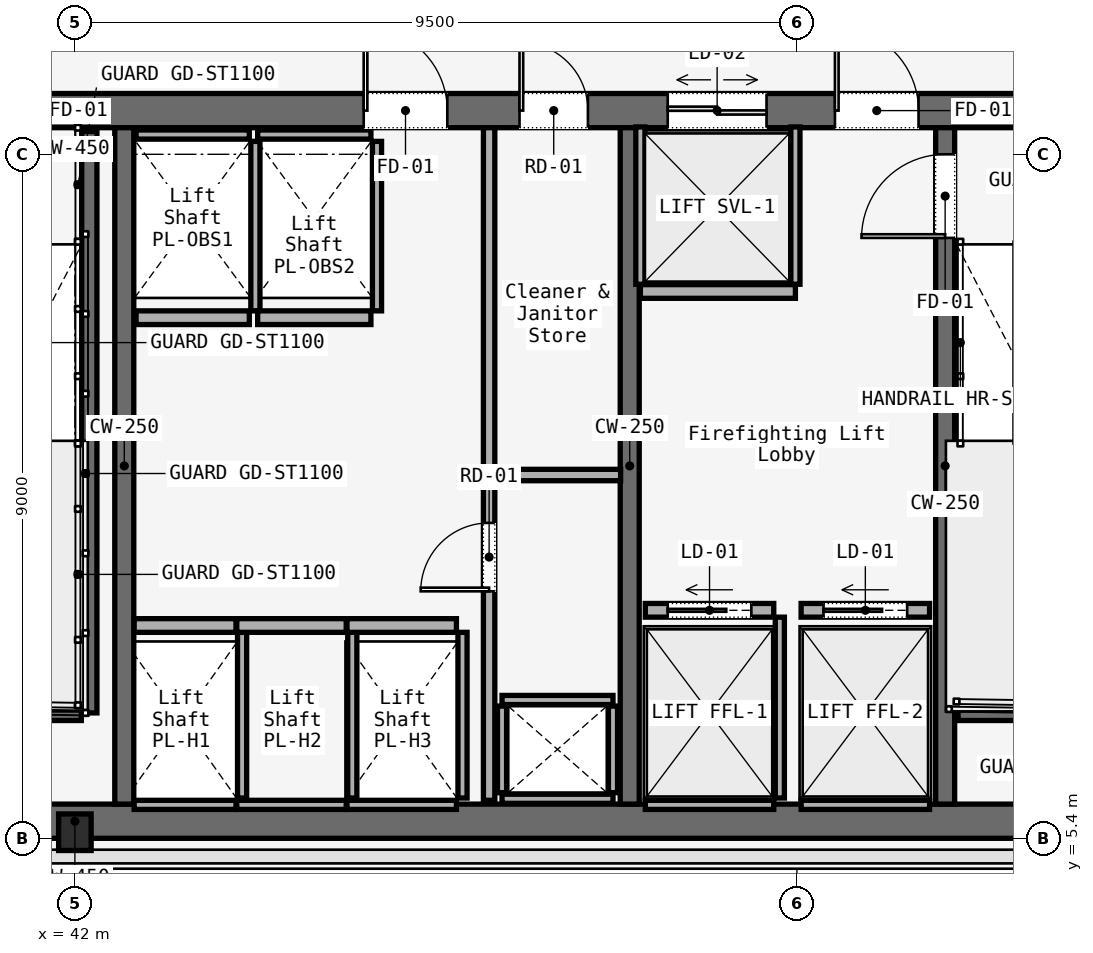
"""IFC4 building model, lengths in metres.
Left out: names, types, materials, properties, quantities, classifications, styles, units other than length and angle.
Written with IfcOpenShell. Run it as: python <this file> out.ifc"""

import sys

from ifc_helpers import new_model, si_unit, direction, frame, frame_2d, origin, origin_2d, place, context, subcontext, project, spatial, rectangle, i_section, extrude, element, fill, save


model = new_model("IFC4")
c1 = context("Model", 3, precision=1e-05, world=origin(), true_north=direction((0.0, 1.0)))
c2 = subcontext(c1, "Body", "Model", "MODEL_VIEW")
j1 = project(units=[si_unit("LENGTHUNIT", "METRE"), si_unit("PLANEANGLEUNIT", "RADIAN")], contexts=[c1])
p1 = place(None, origin())
s1 = spatial("IfcSite", under=j1, at=p1, CompositionType="ELEMENT")
p2 = place(p1, origin())
s2 = spatial("IfcBuilding", under=s1, at=p2, CompositionType="ELEMENT")
p3 = place(p2, frame((0.0, 0.0, 146.0)))
s3 = spatial("IfcBuildingStorey", under=s2, at=p3, CompositionType="ELEMENT", Elevation=146.0)
p4 = place(p3, frame((26.45, 14.975, 0.0), z_axis=(0.0, 0.0, 1.0), x_axis=(1.0, 0.0, 0.0)))
e1 = element("IfcWall", 1, at=p4, inside=s3, PredefinedType="SOLIDWALL", context=c2, shape_type="SweptSolid", body=[
    extrude(rectangle(XDim=31.1, YDim=0.45, at=frame_2d((15.55, 0.0))), origin(), (0.0, 0.0, 1.0), 3.58),
])
p5 = place(p4, frame((1.65, 0.0, 0.0)))
e2 = element("IfcOpeningElement", 2, at=p5, cuts=e1, PredefinedType="OPENING", context=c2, shape_type="SweptSolid", body=[
    extrude(rectangle(XDim=1.1, YDim=2.2, at=frame_2d((0.55, 1.1))), frame((0.0, 0.225, 0.0), z_axis=(0.0, -1.0, 0.0), x_axis=(1.0, 0.0, 0.0)), (0.0, 0.0, 1.0), 0.45),
])
p6 = place(p4, frame((13.65, 0.0, 0.0)))
e3 = element("IfcOpeningElement", 3, at=p6, cuts=e1, PredefinedType="OPENING", context=c2, shape_type="SweptSolid", body=[
    extrude(rectangle(XDim=1.1, YDim=2.2, at=frame_2d((0.55, 1.1))), frame((0.0, 0.225, 0.0), z_axis=(0.0, -1.0, 0.0), x_axis=(1.0, 0.0, 0.0)), (0.0, 0.0, 1.0), 0.45),
])
p7 = place(p4, frame((25.55, 0.0, 0.0)))
e4 = element("IfcOpeningElement", 4, at=p7, cuts=e1, PredefinedType="OPENING", context=c2, shape_type="SweptSolid", body=[
    extrude(rectangle(XDim=1.1, YDim=2.2, at=frame_2d((0.55, 1.1))), frame((0.0, 0.225, 0.0), z_axis=(0.0, -1.0, 0.0), x_axis=(1.0, 0.0, 0.0)), (0.0, 0.0, 1.0), 0.45),
])
p8 = place(p4, frame((10.7, 0.0, 0.0)))
e5 = element("IfcOpeningElement", 5, at=p8, cuts=e1, PredefinedType="OPENING", context=c2, shape_type="SweptSolid", body=[
    extrude(rectangle(XDim=1.4, YDim=2.2, at=frame_2d((0.7, 1.1))), frame((0.0, 0.225, 0.0), z_axis=(0.0, -1.0, 0.0), x_axis=(1.0, 0.0, 0.0)), (0.0, 0.0, 1.0), 0.45),
])
p9 = place(p4, frame((19.35, 0.0, 0.0)))
e6 = element("IfcOpeningElement", 6, at=p9, cuts=e1, PredefinedType="OPENING", context=c2, shape_type="SweptSolid", body=[
    extrude(rectangle(XDim=1.1, YDim=2.2, at=frame_2d((0.55, 1.1))), frame((0.0, 0.225, 0.0), z_axis=(0.0, -1.0, 0.0), x_axis=(1.0, 0.0, 0.0)), (0.0, 0.0, 1.0), 0.45),
])
p10 = place(p4, frame((21.4, 0.0, 0.0)))
e7 = element("IfcOpeningElement", 7, at=p10, cuts=e1, PredefinedType="OPENING", context=c2, shape_type="SweptSolid", body=[
    extrude(rectangle(XDim=0.9, YDim=2.1, at=frame_2d((0.45, 1.05))), frame((0.0, 0.225, 0.0), z_axis=(0.0, -1.0, 0.0), x_axis=(1.0, 0.0, 0.0)), (0.0, 0.0, 1.0), 0.45),
])
p11 = place(p4, frame((23.35, 0.0, 0.0)))
e8 = element("IfcOpeningElement", 8, at=p11, cuts=e1, PredefinedType="OPENING", context=c2, shape_type="SweptSolid", body=[
    extrude(rectangle(XDim=1.3, YDim=2.3, at=frame_2d((0.65, 1.15))), frame((0.0, 0.225, 0.0), z_axis=(0.0, -1.0, 0.0), x_axis=(1.0, 0.0, 0.0)), (0.0, 0.0, 1.0), 0.45),
])
p12 = place(p3, frame((26.45, 5.625, 0.0), z_axis=(0.0, 0.0, 1.0), x_axis=(1.0, 0.0, 0.0)))
e9 = element("IfcWall", 9, at=p12, inside=s3, PredefinedType="SOLIDWALL", context=c2, shape_type="SweptSolid", body=[
    extrude(rectangle(XDim=31.1, YDim=0.45, at=frame_2d((15.55, 0.0))), origin(), (0.0, 0.0, 1.0), 3.58),
])
for number, where, z_axis, x_axis in (
    (10, (42.65, 5.85, 0.0), (0.0, 0.0, 1.0), (0.0, 1.0, 0.0)),
    (11, (49.3, 5.85, 0.0), (0.0, 0.0, 1.0), (0.0, 1.0, 0.0)),
):
    element("IfcWall", number, at=place(p3, frame(where, z_axis=z_axis, x_axis=x_axis)), inside=s3, PredefinedType="SOLIDWALL", context=c2, shape_type="SweptSolid", body=[
        extrude(rectangle(XDim=8.9, YDim=0.25, at=frame_2d((4.45, 0.0))), origin(), (0.0, 0.0, 1.0), 3.58),
    ])
p13 = place(p3, frame((53.45, 5.85, 0.0), z_axis=(0.0, 0.0, 1.0), x_axis=(0.0, 1.0, 0.0)))
e12 = element("IfcWall", 12, at=p13, inside=s3, PredefinedType="SOLIDWALL", context=c2, shape_type="SweptSolid", body=[
    extrude(rectangle(XDim=8.9, YDim=0.25, at=frame_2d((4.45, 0.0))), origin(), (0.0, 0.0, 1.0), 3.58),
])
p14 = place(p13, frame((7.45, 0.0, 0.0)))
e13 = element("IfcOpeningElement", 13, at=p14, cuts=e12, PredefinedType="OPENING", context=c2, shape_type="SweptSolid", body=[
    extrude(rectangle(XDim=1.1, YDim=2.2, at=frame_2d((0.55, 1.1))), frame((0.0, 0.125, 0.0), z_axis=(0.0, -1.0, 0.0), x_axis=(1.0, 0.0, 0.0)), (0.0, 0.0, 1.0), 0.25),
])
p15 = place(p3, frame((42.0, 5.48, 0.0), z_axis=(0.0, 0.0, 1.0), x_axis=(1.0, 0.0, 0.0)))
e14 = element("IfcColumn", 14, at=p15, inside=s3, PredefinedType="COLUMN", context=c2, shape_type="SweptSolid", body=[
    extrude(i_section(OverallWidth=0.428, OverallDepth=0.481, WebThickness=0.051, FlangeThickness=0.065, FilletRadius=0.015, at=origin_2d()), origin(), (0.0, 0.0, 1.0), 3.58),
])
p16 = place(p3, frame((42.19, 14.7, 0.0), z_axis=(0.0, 0.0, 1.0), x_axis=(0.0, -1.0, 0.0)))
e15 = element("IfcWall", 15, at=p16, inside=s3, PredefinedType="SOLIDWALL", context=c2, shape_type="SweptSolid", body=[
    extrude(rectangle(XDim=7.65, YDim=0.2, at=frame_2d((3.825, 0.0))), origin(), (0.0, 0.0, 1.0), 3.8),
])
for number, where, z_axis, x_axis in (
    (16, (38.97, 7.05, 0.0), (0.0, 0.0, 1.0), (1.0, 0.0, 0.0)),
    (17, (53.62, 7.05, 0.0), (0.0, 0.0, 1.0), (1.0, 0.0, 0.0)),
):
    element("IfcWall", number, at=place(p3, frame(where, z_axis=z_axis, x_axis=x_axis)), inside=s3, PredefinedType="SOLIDWALL", context=c2, shape_type="SweptSolid", body=[
        extrude(rectangle(XDim=3.115, YDim=0.2, at=frame_2d((1.558, 0.0))), origin(), (0.0, 0.0, 1.0), 3.8),
    ])
for number, where, z_axis, x_axis in (
    (18, (47.62, 5.92, 0.0), (0.0, 0.0, 1.0), (1.0, 0.0, 0.0)),
    (19, (47.62, 7.22, 0.0), (0.0, 0.0, 1.0), (1.0, 0.0, 0.0)),
):
    element("IfcWall", number, at=place(p3, frame(where, z_axis=z_axis, x_axis=x_axis)), inside=s3, PredefinedType="SOLIDWALL", context=c2, shape_type="SweptSolid", body=[
        extrude(rectangle(XDim=1.46, YDim=0.12, at=frame_2d((0.73, 0.0))), origin(), (0.0, 0.0, 1.0), 3.01),
    ])
for number, where, z_axis, x_axis in (
    (20, (47.62, 6.0, 0.0), (0.0, 0.0, 1.0), (0.0, 1.0, 0.0)),
    (21, (49.08, 6.0, 0.0), (0.0, 0.0, 1.0), (0.0, 1.0, 0.0)),
):
    element("IfcWall", number, at=place(p3, frame(where, z_axis=z_axis, x_axis=x_axis)), inside=s3, PredefinedType="SOLIDWALL", context=c2, shape_type="SweptSolid", body=[
        extrude(rectangle(XDim=1.14, YDim=0.12, at=frame_2d((0.57, 0.0))), origin(), (0.0, 0.0, 1.0), 3.01),
    ])
p17 = place(p3, frame((47.45, 5.9, 0.0), z_axis=(0.0, 0.0, 1.0), x_axis=(0.0, 1.0, 0.0)))
e22 = element("IfcWall", 22, at=p17, inside=s3, PredefinedType="PARTITIONING", context=c2, shape_type="SweptSolid", body=[
    extrude(rectangle(XDim=8.85, YDim=0.15, at=frame_2d((4.425, 0.0))), origin(), (0.0, 0.0, 1.0), 3.01),
])
p18 = place(p17, frame((2.75, 0.0, 0.0)))
e23 = element("IfcOpeningElement", 23, at=p18, cuts=e22, PredefinedType="OPENING", context=c2, shape_type="SweptSolid", body=[
    extrude(rectangle(XDim=0.9, YDim=2.1, at=frame_2d((0.45, 1.05))), frame((0.0, 0.075, 0.0), z_axis=(0.0, -1.0, 0.0), x_axis=(1.0, 0.0, 0.0)), (0.0, 0.0, 1.0), 0.15),
])
p19 = place(p3, frame((47.45, 10.18, 0.0), z_axis=(0.0, 0.0, 1.0), x_axis=(1.0, 0.0, 0.0)))
e24 = element("IfcWall", 24, at=p19, inside=s3, PredefinedType="PARTITIONING", context=c2, shape_type="SweptSolid", body=[
    extrude(rectangle(XDim=1.73, YDim=0.15, at=frame_2d((0.865, 0.0))), origin(), (0.0, 0.0, 1.0), 3.01),
])
p20 = place(p3, frame((42.78, 8.2, 0.0), z_axis=(0.0, 0.0, 1.0), x_axis=(1.0, 0.0, 0.0)))
e25 = element("IfcWall", 25, at=p20, inside=s3, PredefinedType="SOLIDWALL", context=c2, shape_type="SweptSolid", body=[
    extrude(rectangle(XDim=1.34, YDim=0.18, at=frame_2d((0.67, 0.0))), origin(), (0.0, 0.0, 1.0), 3.01),
])
p21 = place(p3, frame((42.78, 5.84, 0.0), z_axis=(0.0, 0.0, 1.0), x_axis=(1.0, 0.0, 0.0)))
e26 = element("IfcWall", 26, at=p21, inside=s3, PredefinedType="SOLIDWALL", context=c2, shape_type="SweptSolid", body=[
    extrude(rectangle(XDim=1.34, YDim=0.12, at=frame_2d((0.67, 0.0))), origin(), (0.0, 0.0, 1.0), 3.01),
])
p22 = place(p3, frame((44.2, 5.93, 0.0), z_axis=(0.0, 0.0, 1.0), x_axis=(0.0, 1.0, 0.0)))
e27 = element("IfcWall", 27, at=p22, inside=s3, PredefinedType="SOLIDWALL", context=c2, shape_type="SweptSolid", body=[
    extrude(rectangle(XDim=2.18, YDim=0.12, at=frame_2d((1.09, 0.0))), origin(), (0.0, 0.0, 1.0), 3.01),
])
p23 = place(p3, frame((44.13, 8.2, 0.0), z_axis=(0.0, 0.0, 1.0), x_axis=(1.0, 0.0, 0.0)))
e28 = element("IfcWall", 28, at=p23, inside=s3, PredefinedType="SOLIDWALL", context=c2, shape_type="SweptSolid", body=[
    extrude(rectangle(XDim=1.44, YDim=0.18, at=frame_2d((0.72, 0.0))), origin(), (0.0, 0.0, 1.0), 3.01),
])
p24 = place(p3, frame((44.13, 5.84, 0.0), z_axis=(0.0, 0.0, 1.0), x_axis=(1.0, 0.0, 0.0)))
e29 = element("IfcWall", 29, at=p24, inside=s3, PredefinedType="SOLIDWALL", context=c2, shape_type="SweptSolid", body=[
    extrude(rectangle(XDim=1.44, YDim=0.12, at=frame_2d((0.72, 0.0))), origin(), (0.0, 0.0, 1.0), 3.01),
])
p25 = place(p3, frame((45.65, 5.93, 0.0), z_axis=(0.0, 0.0, 1.0), x_axis=(0.0, 1.0, 0.0)))
e30 = element("IfcWall", 30, at=p25, inside=s3, PredefinedType="SOLIDWALL", context=c2, shape_type="SweptSolid", body=[
    extrude(rectangle(XDim=2.18, YDim=0.12, at=frame_2d((1.09, 0.0))), origin(), (0.0, 0.0, 1.0), 3.01),
])
p26 = place(p3, frame((45.58, 8.2, 0.0), z_axis=(0.0, 0.0, 1.0), x_axis=(1.0, 0.0, 0.0)))
e31 = element("IfcWall", 31, at=p26, inside=s3, PredefinedType="SOLIDWALL", context=c2, shape_type="SweptSolid", body=[
    extrude(rectangle(XDim=1.44, YDim=0.18, at=frame_2d((0.72, 0.0))), origin(), (0.0, 0.0, 1.0), 3.01),
])
p27 = place(p3, frame((45.58, 5.84, 0.0), z_axis=(0.0, 0.0, 1.0), x_axis=(1.0, 0.0, 0.0)))
e32 = element("IfcWall", 32, at=p27, inside=s3, PredefinedType="SOLIDWALL", context=c2, shape_type="SweptSolid", body=[
    extrude(rectangle(XDim=1.44, YDim=0.12, at=frame_2d((0.72, 0.0))), origin(), (0.0, 0.0, 1.0), 3.01),
])
p28 = place(p3, frame((47.1, 5.93, 0.0), z_axis=(0.0, 0.0, 1.0), x_axis=(0.0, 1.0, 0.0)))
e33 = element("IfcWall", 33, at=p28, inside=s3, PredefinedType="SOLIDWALL", context=c2, shape_type="SweptSolid", body=[
    extrude(rectangle(XDim=2.18, YDim=0.12, at=frame_2d((1.09, 0.0))), origin(), (0.0, 0.0, 1.0), 3.01),
])
p29 = place(p3, frame((42.805, 12.25, 0.0), z_axis=(0.0, 0.0, 1.0), x_axis=(1.0, 0.0, 0.0)))
e34 = element("IfcWall", 34, at=p29, inside=s3, PredefinedType="SOLIDWALL", context=c2, shape_type="SweptSolid", body=[
    extrude(rectangle(XDim=1.49, YDim=0.18, at=frame_2d((0.745, 0.0))), origin(), (0.0, 0.0, 1.0), 3.01),
])
p30 = place(p3, frame((42.805, 14.66, 0.0), z_axis=(0.0, 0.0, 1.0), x_axis=(1.0, 0.0, 0.0)))
e35 = element("IfcWall", 35, at=p30, inside=s3, PredefinedType="SOLIDWALL", context=c2, shape_type="SweptSolid", body=[
    extrude(rectangle(XDim=1.49, YDim=0.12, at=frame_2d((0.745, 0.0))), origin(), (0.0, 0.0, 1.0), 3.01),
])
p31 = place(p3, frame((44.375, 12.34, 0.0), z_axis=(0.0, 0.0, 1.0), x_axis=(0.0, 1.0, 0.0)))
e36 = element("IfcWall", 36, at=p31, inside=s3, PredefinedType="SOLIDWALL", context=c2, shape_type="SweptSolid", body=[
    extrude(rectangle(XDim=2.23, YDim=0.12, at=frame_2d((1.115, 0.0))), origin(), (0.0, 0.0, 1.0), 3.01),
])
p32 = place(p3, frame((44.405, 12.25, 0.0), z_axis=(0.0, 0.0, 1.0), x_axis=(1.0, 0.0, 0.0)))
e37 = element("IfcWall", 37, at=p32, inside=s3, PredefinedType="SOLIDWALL", context=c2, shape_type="SweptSolid", body=[
    extrude(rectangle(XDim=1.49, YDim=0.18, at=frame_2d((0.745, 0.0))), origin(), (0.0, 0.0, 1.0), 3.01),
])
p33 = place(p3, frame((44.405, 14.66, 0.0), z_axis=(0.0, 0.0, 1.0), x_axis=(1.0, 0.0, 0.0)))
e38 = element("IfcWall", 38, at=p33, inside=s3, PredefinedType="SOLIDWALL", context=c2, shape_type="SweptSolid", body=[
    extrude(rectangle(XDim=1.49, YDim=0.12, at=frame_2d((0.745, 0.0))), origin(), (0.0, 0.0, 1.0), 3.01),
])
p34 = place(p3, frame((45.975, 12.34, 0.0), z_axis=(0.0, 0.0, 1.0), x_axis=(0.0, 1.0, 0.0)))
e39 = element("IfcWall", 39, at=p34, inside=s3, PredefinedType="SOLIDWALL", context=c2, shape_type="SweptSolid", body=[
    extrude(rectangle(XDim=2.23, YDim=0.12, at=frame_2d((1.115, 0.0))), origin(), (0.0, 0.0, 1.0), 3.01),
])
p35 = place(p3, frame((49.505, 8.4, 0.0), z_axis=(0.0, 0.0, 1.0), x_axis=(1.0, 0.0, 0.0)))
e40 = element("IfcWall", 40, at=p35, inside=s3, PredefinedType="SOLIDWALL", context=c2, shape_type="SweptSolid", body=[
    extrude(rectangle(XDim=1.69, YDim=0.18, at=frame_2d((0.845, 0.0))), origin(), (0.0, 0.0, 1.0), 3.01),
])
p36 = place(p35, frame((0.295, 0.0, 0.0)))
e41 = element("IfcOpeningElement", 41, at=p36, cuts=e40, PredefinedType="OPENING", context=c2, shape_type="SweptSolid", body=[
    extrude(rectangle(XDim=1.1, YDim=2.2, at=frame_2d((0.55, 1.1))), frame((0.0, 0.09, 0.0), z_axis=(0.0, -1.0, 0.0), x_axis=(1.0, 0.0, 0.0)), (0.0, 0.0, 1.0), 0.18),
])
p37 = place(p3, frame((49.505, 5.84, 0.0), z_axis=(0.0, 0.0, 1.0), x_axis=(1.0, 0.0, 0.0)))
e42 = element("IfcWall", 42, at=p37, inside=s3, PredefinedType="SOLIDWALL", context=c2, shape_type="SweptSolid", body=[
    extrude(rectangle(XDim=1.69, YDim=0.12, at=frame_2d((0.845, 0.0))), origin(), (0.0, 0.0, 1.0), 3.01),
])
p38 = place(p3, frame((51.275, 5.93, 0.0), z_axis=(0.0, 0.0, 1.0), x_axis=(0.0, 1.0, 0.0)))
e43 = element("IfcWall", 43, at=p38, inside=s3, PredefinedType="SOLIDWALL", context=c2, shape_type="SweptSolid", body=[
    extrude(rectangle(XDim=2.38, YDim=0.12, at=frame_2d((1.19, 0.0))), origin(), (0.0, 0.0, 1.0), 3.01),
])
p39 = place(p3, frame((51.555, 8.4, 0.0), z_axis=(0.0, 0.0, 1.0), x_axis=(1.0, 0.0, 0.0)))
e44 = element("IfcWall", 44, at=p39, inside=s3, PredefinedType="SOLIDWALL", context=c2, shape_type="SweptSolid", body=[
    extrude(rectangle(XDim=1.69, YDim=0.18, at=frame_2d((0.845, 0.0))), origin(), (0.0, 0.0, 1.0), 3.01),
])
p40 = place(p39, frame((0.295, 0.0, 0.0)))
e45 = element("IfcOpeningElement", 45, at=p40, cuts=e44, PredefinedType="OPENING", context=c2, shape_type="SweptSolid", body=[
    extrude(rectangle(XDim=1.1, YDim=2.2, at=frame_2d((0.55, 1.1))), frame((0.0, 0.09, 0.0), z_axis=(0.0, -1.0, 0.0), x_axis=(1.0, 0.0, 0.0)), (0.0, 0.0, 1.0), 0.18),
])
p41 = place(p3, frame((51.555, 5.84, 0.0), z_axis=(0.0, 0.0, 1.0), x_axis=(1.0, 0.0, 0.0)))
e46 = element("IfcWall", 46, at=p41, inside=s3, PredefinedType="SOLIDWALL", context=c2, shape_type="SweptSolid", body=[
    extrude(rectangle(XDim=1.69, YDim=0.12, at=frame_2d((0.845, 0.0))), origin(), (0.0, 0.0, 1.0), 3.01),
])
p42 = place(p3, frame((49.44, 12.595, 0.0), z_axis=(0.0, 0.0, 1.0), x_axis=(1.0, 0.0, 0.0)))
e47 = element("IfcWall", 47, at=p42, inside=s3, PredefinedType="SOLIDWALL", context=c2, shape_type="SweptSolid", body=[
    extrude(rectangle(XDim=2.04, YDim=0.18, at=frame_2d((1.02, 0.0))), origin(), (0.0, 0.0, 1.0), 3.01),
])
for number, where, z_axis, x_axis in (
    (48, (49.44, 12.69, 0.0), (0.0, 0.0, 1.0), (0.0, 1.0, 0.0)),
    (49, (51.48, 12.69, 0.0), (0.0, 0.0, 1.0), (0.0, 1.0, 0.0)),
):
    element("IfcWall", number, at=place(p3, frame(where, z_axis=z_axis, x_axis=x_axis)), inside=s3, PredefinedType="SOLIDWALL", context=c2, shape_type="SweptSolid", body=[
        extrude(rectangle(XDim=2.07, YDim=0.12, at=frame_2d((1.035, 0.0))), origin(), (0.0, 0.0, 1.0), 3.01),
    ])
p43 = place(p7, origin())
e50 = element("IfcDoor", 50, at=p43, inside=s3, OperationType="SINGLE_SWING_RIGHT", PredefinedType="DOOR", context=c2, shape_type="SweptSolid", body=[
    extrude(rectangle(XDim=1.1, YDim=2.2, at=frame_2d((0.55, 1.1))), frame((0.0, 0.025, 0.0), z_axis=(0.0, -1.0, 0.0), x_axis=(1.0, 0.0, 0.0)), (0.0, 0.0, 1.0), 0.05),
])
fill(e4, e50)
p44 = place(p9, origin())
e51 = element("IfcDoor", 51, at=p44, inside=s3, OperationType="SINGLE_SWING_LEFT", PredefinedType="DOOR", context=c2, shape_type="SweptSolid", body=[
    extrude(rectangle(XDim=1.1, YDim=2.2, at=frame_2d((0.55, 1.1))), frame((0.0, 0.025, 0.0), z_axis=(0.0, -1.0, 0.0), x_axis=(1.0, 0.0, 0.0)), (0.0, 0.0, 1.0), 0.05),
])
fill(e6, e51)
p45 = place(p10, origin())
e52 = element("IfcDoor", 52, at=p45, inside=s3, OperationType="SINGLE_SWING_LEFT", PredefinedType="DOOR", context=c2, shape_type="SweptSolid", body=[
    extrude(rectangle(XDim=0.9, YDim=2.1, at=frame_2d((0.45, 1.05))), frame((0.0, 0.025, 0.0), z_axis=(0.0, -1.0, 0.0), x_axis=(1.0, 0.0, 0.0)), (0.0, 0.0, 1.0), 0.05),
])
fill(e7, e52)
p46 = place(p14, origin())
e53 = element("IfcDoor", 53, at=p46, inside=s3, OperationType="SINGLE_SWING_LEFT", PredefinedType="DOOR", context=c2, shape_type="SweptSolid", body=[
    extrude(rectangle(XDim=1.1, YDim=2.2, at=frame_2d((0.55, 1.1))), frame((0.0, 0.025, 0.0), z_axis=(0.0, -1.0, 0.0), x_axis=(1.0, 0.0, 0.0)), (0.0, 0.0, 1.0), 0.05),
])
fill(e13, e53)
p47 = place(p18, origin())
e54 = element("IfcDoor", 54, at=p47, inside=s3, OperationType="SINGLE_SWING_RIGHT", PredefinedType="DOOR", context=c2, shape_type="SweptSolid", body=[
    extrude(rectangle(XDim=0.9, YDim=2.1, at=frame_2d((0.45, 1.05))), frame((0.0, 0.025, 0.0), z_axis=(0.0, -1.0, 0.0), x_axis=(1.0, 0.0, 0.0)), (0.0, 0.0, 1.0), 0.05),
])
fill(e23, e54)
p48 = place(p36, origin())
e55 = element("IfcDoor", 55, at=p48, inside=s3, OperationType="SLIDING_TO_LEFT", PredefinedType="DOOR", context=c2, shape_type="SweptSolid", body=[
    extrude(rectangle(XDim=1.1, YDim=2.2, at=frame_2d((0.55, 1.1))), frame((0.0, 0.025, 0.0), z_axis=(0.0, -1.0, 0.0), x_axis=(1.0, 0.0, 0.0)), (0.0, 0.0, 1.0), 0.05),
])
fill(e41, e55)
p49 = place(p40, origin())
e56 = element("IfcDoor", 56, at=p49, inside=s3, OperationType="SLIDING_TO_LEFT", PredefinedType="DOOR", context=c2, shape_type="SweptSolid", body=[
    extrude(rectangle(XDim=1.1, YDim=2.2, at=frame_2d((0.55, 1.1))), frame((0.0, 0.025, 0.0), z_axis=(0.0, -1.0, 0.0), x_axis=(1.0, 0.0, 0.0)), (0.0, 0.0, 1.0), 0.05),
])
fill(e45, e56)
p50 = place(p11, origin())
e57 = element("IfcDoor", 57, at=p50, inside=s3, OperationType="DOUBLE_DOOR_SLIDING", PredefinedType="DOOR", context=c2, shape_type="SweptSolid", body=[
    extrude(rectangle(XDim=1.3, YDim=2.3, at=frame_2d((0.65, 1.15))), frame((0.0, 0.025, 0.0), z_axis=(0.0, -1.0, 0.0), x_axis=(1.0, 0.0, 0.0)), (0.0, 0.0, 1.0), 0.05),
])
fill(e8, e57)
save(model, sys.argv[1])
